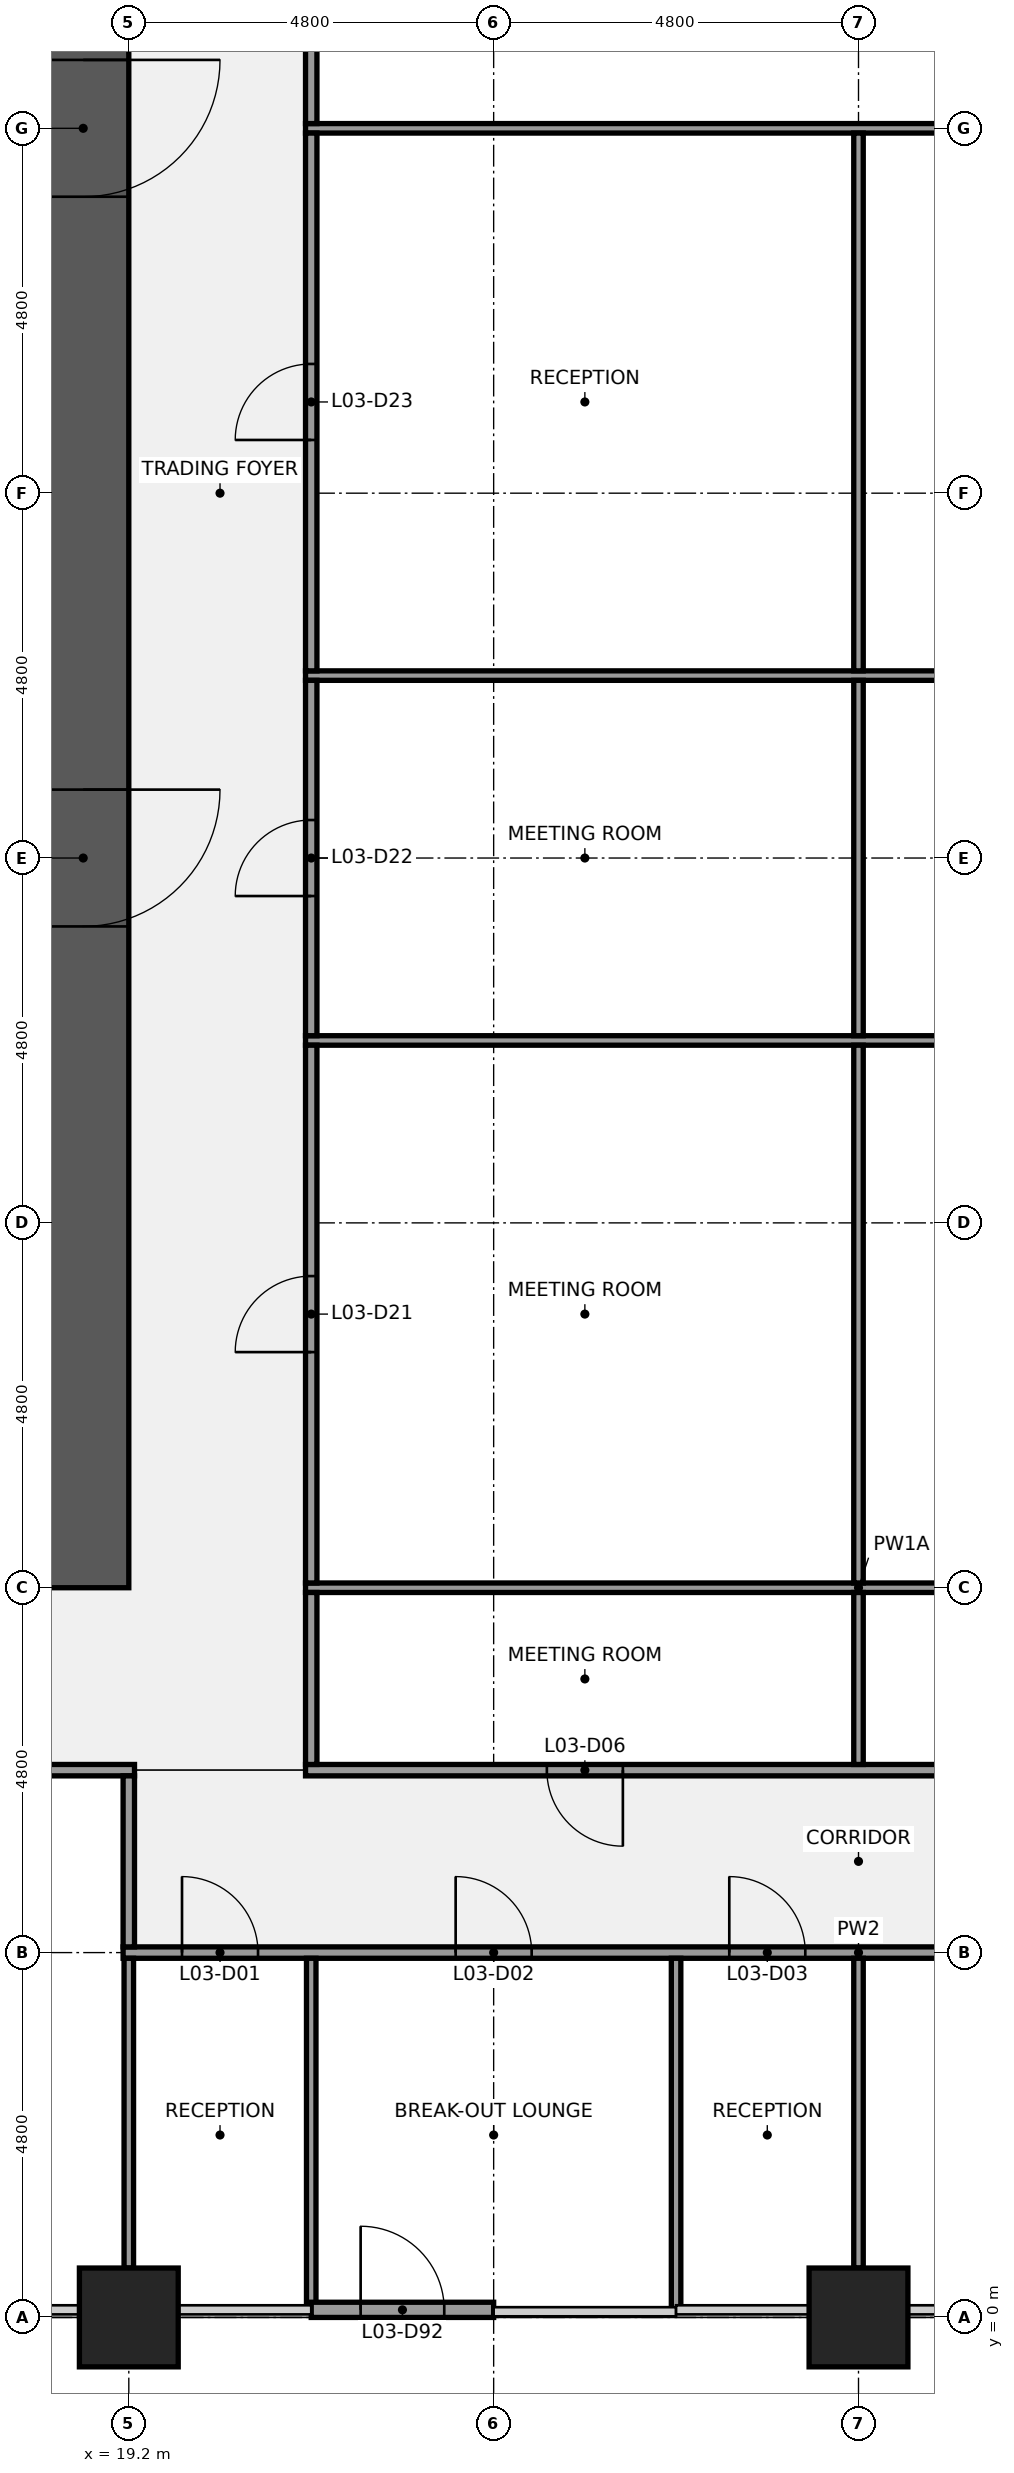
"""IFC4 building model, lengths in metres.
Left out: names, types, materials, properties, quantities, classifications, styles, units other than length and angle.
Written with IfcOpenShell. Run it as: python <this file> out.ifc"""

import sys

from ifc_helpers import new_model, si_unit, direction, frame, frame_2d, origin, origin_2d, place, context, subcontext, project, spatial, rectangle, extrude, element, fill, save


model = new_model("IFC4")
c1 = context("Model", 3, precision=1e-05, world=origin(), true_north=direction((0.0, 1.0)))
c2 = subcontext(c1, "Body", "Model", "MODEL_VIEW")
j1 = project(units=[si_unit("LENGTHUNIT", "METRE"), si_unit("PLANEANGLEUNIT", "RADIAN")], contexts=[c1])
p1 = place(None, origin())
s1 = spatial("IfcSite", under=j1, at=p1, CompositionType="ELEMENT")
p2 = place(p1, origin())
s2 = spatial("IfcBuilding", under=s1, at=p2, CompositionType="ELEMENT")
p3 = place(p2, frame((0.0, 0.0, 21.4)))
s3 = spatial("IfcBuildingStorey", under=s2, at=p3, CompositionType="ELEMENT", Elevation=21.4)
for number, where, z_axis, x_axis in (
    (1, (19.2, 0.0, 0.0), (0.0, 0.0, 1.0), (1.0, 0.0, 0.0)),
    (2, (28.8, 0.0, 0.0), (0.0, 0.0, 1.0), (1.0, 0.0, 0.0)),
):
    element("IfcColumn", number, at=place(p3, frame(where, z_axis=z_axis, x_axis=x_axis)), inside=s3, PredefinedType="COLUMN", context=c2, shape_type="SweptSolid", body=[
        extrude(rectangle(XDim=1.3, YDim=1.3, at=origin_2d()), origin(), (0.0, 0.0, 1.0), 4.4),
    ])
p4 = place(p3, frame((18.6, 38.4, 0.0), z_axis=(0.0, 0.0, 1.0), x_axis=(0.0, -1.0, 0.0)))
e3 = element("IfcWall", 3, at=p4, inside=s3, PredefinedType="SHEAR", context=c2, shape_type="SweptSolid", body=[
    extrude(rectangle(XDim=28.8, YDim=1.2, at=frame_2d((14.4, 0.0))), origin(), (0.0, 0.0, 1.0), 4.24),
])
p5 = place(p4, frame((18.3, 0.0, 0.0)))
e4 = element("IfcOpeningElement", 4, at=p5, cuts=e3, PredefinedType="OPENING", context=c2, shape_type="SweptSolid", body=[
    extrude(rectangle(XDim=1.8, YDim=2.1, at=frame_2d((0.9, 1.05))), frame((0.0, 0.61, 0.0), z_axis=(0.0, -1.0, 0.0), x_axis=(1.0, 0.0, 0.0)), (0.0, 0.0, 1.0), 1.22),
])
p6 = place(p4, frame((8.7, 0.0, 0.0)))
e5 = element("IfcOpeningElement", 5, at=p6, cuts=e3, PredefinedType="OPENING", context=c2, shape_type="SweptSolid", body=[
    extrude(rectangle(XDim=1.8, YDim=2.1, at=frame_2d((0.9, 1.05))), frame((0.0, 0.61, 0.0), z_axis=(0.0, -1.0, 0.0), x_axis=(1.0, 0.0, 0.0)), (0.0, 0.0, 1.0), 1.22),
])
p7 = place(p3, frame((19.125, 4.8, 0.0), z_axis=(0.0, 0.0, 1.0), x_axis=(1.0, 0.0, 0.0)))
e6 = element("IfcWall", 6, at=p7, inside=s3, PredefinedType="PARTITIONING", context=c2, shape_type="SweptSolid", body=[
    extrude(rectangle(XDim=19.35, YDim=0.15, at=frame_2d((9.675, 0.0))), origin(), (0.0, 0.0, 1.0), 3.27),
])
p8 = place(p7, frame((0.775, 0.0, 0.0)))
e7 = element("IfcOpeningElement", 7, at=p8, cuts=e6, PredefinedType="OPENING", context=c2, shape_type="SweptSolid", body=[
    extrude(rectangle(XDim=1.0, YDim=2.1, at=frame_2d((0.5, 1.05))), frame((0.0, 0.085, 0.0), z_axis=(0.0, -1.0, 0.0), x_axis=(1.0, 0.0, 0.0)), (0.0, 0.0, 1.0), 0.17),
])
p9 = place(p7, frame((4.375, 0.0, 0.0)))
e8 = element("IfcOpeningElement", 8, at=p9, cuts=e6, PredefinedType="OPENING", context=c2, shape_type="SweptSolid", body=[
    extrude(rectangle(XDim=1.0, YDim=2.1, at=frame_2d((0.5, 1.05))), frame((0.0, 0.085, 0.0), z_axis=(0.0, -1.0, 0.0), x_axis=(1.0, 0.0, 0.0)), (0.0, 0.0, 1.0), 0.17),
])
p10 = place(p7, frame((7.975, 0.0, 0.0)))
e9 = element("IfcOpeningElement", 9, at=p10, cuts=e6, PredefinedType="OPENING", context=c2, shape_type="SweptSolid", body=[
    extrude(rectangle(XDim=1.0, YDim=2.1, at=frame_2d((0.5, 1.05))), frame((0.0, 0.085, 0.0), z_axis=(0.0, -1.0, 0.0), x_axis=(1.0, 0.0, 0.0)), (0.0, 0.0, 1.0), 0.17),
])
p11 = place(p7, frame((13.975, 0.0, 0.0)))
e10 = element("IfcOpeningElement", 10, at=p11, cuts=e6, PredefinedType="OPENING", context=c2, shape_type="SweptSolid", body=[
    extrude(rectangle(XDim=1.0, YDim=2.1, at=frame_2d((0.5, 1.05))), frame((0.0, 0.085, 0.0), z_axis=(0.0, -1.0, 0.0), x_axis=(1.0, 0.0, 0.0)), (0.0, 0.0, 1.0), 0.17),
])
p12 = place(p3, frame((14.325, 7.2, 0.0), z_axis=(0.0, 0.0, 1.0), x_axis=(1.0, 0.0, 0.0)))
e11 = element("IfcWall", 11, at=p12, inside=s3, PredefinedType="PARTITIONING", context=c2, shape_type="SweptSolid", body=[
    extrude(rectangle(XDim=4.95, YDim=0.15, at=frame_2d((2.475, 0.0))), origin(), (0.0, 0.0, 1.0), 3.27),
])
p13 = place(p12, frame((1.975, 0.0, 0.0)))
e12 = element("IfcOpeningElement", 12, at=p13, cuts=e11, PredefinedType="OPENING", context=c2, shape_type="SweptSolid", body=[
    extrude(rectangle(XDim=1.0, YDim=2.1, at=frame_2d((0.5, 1.05))), frame((0.0, 0.085, 0.0), z_axis=(0.0, -1.0, 0.0), x_axis=(1.0, 0.0, 0.0)), (0.0, 0.0, 1.0), 0.17),
])
p14 = place(p3, frame((21.525, 7.2, 0.0), z_axis=(0.0, 0.0, 1.0), x_axis=(1.0, 0.0, 0.0)))
e13 = element("IfcWall", 13, at=p14, inside=s3, PredefinedType="PARTITIONING", context=c2, shape_type="SweptSolid", body=[
    extrude(rectangle(XDim=14.55, YDim=0.15, at=frame_2d((7.275, 0.0))), origin(), (0.0, 0.0, 1.0), 3.27),
])
p15 = place(p14, frame((3.175, 0.0, 0.0)))
e14 = element("IfcOpeningElement", 14, at=p15, cuts=e13, PredefinedType="OPENING", context=c2, shape_type="SweptSolid", body=[
    extrude(rectangle(XDim=1.0, YDim=2.1, at=frame_2d((0.5, 1.05))), frame((0.0, 0.085, 0.0), z_axis=(0.0, -1.0, 0.0), x_axis=(1.0, 0.0, 0.0)), (0.0, 0.0, 1.0), 0.17),
])
p16 = place(p14, frame((10.375, 0.0, 0.0)))
e15 = element("IfcOpeningElement", 15, at=p16, cuts=e13, PredefinedType="OPENING", context=c2, shape_type="SweptSolid", body=[
    extrude(rectangle(XDim=1.0, YDim=2.1, at=frame_2d((0.5, 1.05))), frame((0.0, 0.085, 0.0), z_axis=(0.0, -1.0, 0.0), x_axis=(1.0, 0.0, 0.0)), (0.0, 0.0, 1.0), 0.17),
])
for number, where, z_axis, x_axis in (
    (16, (21.525, 9.6, 0.0), (0.0, 0.0, 1.0), (1.0, 0.0, 0.0)),
    (17, (21.525, 16.8, 0.0), (0.0, 0.0, 1.0), (1.0, 0.0, 0.0)),
    (18, (21.525, 21.6, 0.0), (0.0, 0.0, 1.0), (1.0, 0.0, 0.0)),
    (19, (21.525, 28.8, 0.0), (0.0, 0.0, 1.0), (1.0, 0.0, 0.0)),
):
    element("IfcWall", number, at=place(p3, frame(where, z_axis=z_axis, x_axis=x_axis)), inside=s3, PredefinedType="PARTITIONING", context=c2, shape_type="SweptSolid", body=[
        extrude(rectangle(XDim=14.55, YDim=0.125, at=frame_2d((7.275, 0.0))), origin(), (0.0, 0.0, 1.0), 3.27),
    ])
p17 = place(p3, frame((19.2, 0.65, 0.0), z_axis=(0.0, 0.0, 1.0), x_axis=(0.0, 1.0, 0.0)))
e20 = element("IfcWall", 20, at=p17, inside=s3, PredefinedType="PARTITIONING", context=c2, shape_type="SweptSolid", body=[
    extrude(rectangle(XDim=4.075, YDim=0.125, at=frame_2d((2.038, 0.0))), origin(), (0.0, 0.0, 1.0), 3.27),
])
p18 = place(p3, frame((19.2, 4.875, 0.0), z_axis=(0.0, 0.0, 1.0), x_axis=(0.0, 1.0, 0.0)))
e21 = element("IfcWall", 21, at=p18, inside=s3, PredefinedType="PARTITIONING", context=c2, shape_type="SweptSolid", body=[
    extrude(rectangle(XDim=2.25, YDim=0.15, at=frame_2d((1.125, 0.0))), origin(), (0.0, 0.0, 1.0), 3.27),
])
p19 = place(p3, frame((21.6, 0.1, 0.0), z_axis=(0.0, 0.0, 1.0), x_axis=(0.0, 1.0, 0.0)))
e22 = element("IfcWall", 22, at=p19, inside=s3, PredefinedType="PARTITIONING", context=c2, shape_type="SweptSolid", body=[
    extrude(rectangle(XDim=4.625, YDim=0.125, at=frame_2d((2.312, 0.0))), origin(), (0.0, 0.0, 1.0), 3.27),
])
p20 = place(p3, frame((21.6, 7.275, 0.0), z_axis=(0.0, 0.0, 1.0), x_axis=(0.0, 1.0, 0.0)))
e23 = element("IfcWall", 23, at=p20, inside=s3, PredefinedType="PARTITIONING", context=c2, shape_type="SweptSolid", body=[
    extrude(rectangle(XDim=2.263, YDim=0.15, at=frame_2d((1.131, 0.0))), origin(), (0.0, 0.0, 1.0), 3.27),
])
p21 = place(p3, frame((21.6, 9.663, 0.0), z_axis=(0.0, 0.0, 1.0), x_axis=(0.0, 1.0, 0.0)))
e24 = element("IfcWall", 24, at=p21, inside=s3, PredefinedType="PARTITIONING", context=c2, shape_type="SweptSolid", body=[
    extrude(rectangle(XDim=7.075, YDim=0.15, at=frame_2d((3.538, 0.0))), origin(), (0.0, 0.0, 1.0), 3.27),
])
p22 = place(p21, frame((3.038, 0.0, 0.0)))
e25 = element("IfcOpeningElement", 25, at=p22, cuts=e24, PredefinedType="OPENING", context=c2, shape_type="SweptSolid", body=[
    extrude(rectangle(XDim=1.0, YDim=2.1, at=frame_2d((0.5, 1.05))), frame((0.0, 0.085, 0.0), z_axis=(0.0, -1.0, 0.0), x_axis=(1.0, 0.0, 0.0)), (0.0, 0.0, 1.0), 0.17),
])
p23 = place(p3, frame((21.6, 16.863, 0.0), z_axis=(0.0, 0.0, 1.0), x_axis=(0.0, 1.0, 0.0)))
e26 = element("IfcWall", 26, at=p23, inside=s3, PredefinedType="PARTITIONING", context=c2, shape_type="SweptSolid", body=[
    extrude(rectangle(XDim=4.675, YDim=0.15, at=frame_2d((2.337, 0.0))), origin(), (0.0, 0.0, 1.0), 3.27),
])
p24 = place(p23, frame((1.837, 0.0, 0.0)))
e27 = element("IfcOpeningElement", 27, at=p24, cuts=e26, PredefinedType="OPENING", context=c2, shape_type="SweptSolid", body=[
    extrude(rectangle(XDim=1.0, YDim=2.1, at=frame_2d((0.5, 1.05))), frame((0.0, 0.085, 0.0), z_axis=(0.0, -1.0, 0.0), x_axis=(1.0, 0.0, 0.0)), (0.0, 0.0, 1.0), 0.17),
])
p25 = place(p3, frame((21.6, 21.663, 0.0), z_axis=(0.0, 0.0, 1.0), x_axis=(0.0, 1.0, 0.0)))
e28 = element("IfcWall", 28, at=p25, inside=s3, PredefinedType="PARTITIONING", context=c2, shape_type="SweptSolid", body=[
    extrude(rectangle(XDim=7.075, YDim=0.15, at=frame_2d((3.538, 0.0))), origin(), (0.0, 0.0, 1.0), 3.27),
])
p26 = place(p25, frame((3.038, 0.0, 0.0)))
e29 = element("IfcOpeningElement", 29, at=p26, cuts=e28, PredefinedType="OPENING", context=c2, shape_type="SweptSolid", body=[
    extrude(rectangle(XDim=1.0, YDim=2.1, at=frame_2d((0.5, 1.05))), frame((0.0, 0.085, 0.0), z_axis=(0.0, -1.0, 0.0), x_axis=(1.0, 0.0, 0.0)), (0.0, 0.0, 1.0), 0.17),
])
p27 = place(p3, frame((21.6, 28.863, 0.0), z_axis=(0.0, 0.0, 1.0), x_axis=(0.0, 1.0, 0.0)))
e30 = element("IfcWall", 30, at=p27, inside=s3, PredefinedType="PARTITIONING", context=c2, shape_type="SweptSolid", body=[
    extrude(rectangle(XDim=4.675, YDim=0.15, at=frame_2d((2.337, 0.0))), origin(), (0.0, 0.0, 1.0), 3.27),
])
p28 = place(p27, frame((1.837, 0.0, 0.0)))
e31 = element("IfcOpeningElement", 31, at=p28, cuts=e30, PredefinedType="OPENING", context=c2, shape_type="SweptSolid", body=[
    extrude(rectangle(XDim=1.0, YDim=2.1, at=frame_2d((0.5, 1.05))), frame((0.0, 0.085, 0.0), z_axis=(0.0, -1.0, 0.0), x_axis=(1.0, 0.0, 0.0)), (0.0, 0.0, 1.0), 0.17),
])
p29 = place(p3, frame((26.4, 0.1, 0.0), z_axis=(0.0, 0.0, 1.0), x_axis=(0.0, 1.0, 0.0)))
e32 = element("IfcWall", 32, at=p29, inside=s3, PredefinedType="PARTITIONING", context=c2, shape_type="SweptSolid", body=[
    extrude(rectangle(XDim=4.625, YDim=0.125, at=frame_2d((2.312, 0.0))), origin(), (0.0, 0.0, 1.0), 3.27),
])
p30 = place(p3, frame((28.8, 0.65, 0.0), z_axis=(0.0, 0.0, 1.0), x_axis=(0.0, 1.0, 0.0)))
e33 = element("IfcWall", 33, at=p30, inside=s3, PredefinedType="PARTITIONING", context=c2, shape_type="SweptSolid", body=[
    extrude(rectangle(XDim=4.075, YDim=0.125, at=frame_2d((2.038, 0.0))), origin(), (0.0, 0.0, 1.0), 3.27),
])
p31 = place(p3, frame((28.8, 7.275, 0.0), z_axis=(0.0, 0.0, 1.0), x_axis=(0.0, 1.0, 0.0)))
e34 = element("IfcWall", 34, at=p31, inside=s3, PredefinedType="PARTITIONING", context=c2, shape_type="SweptSolid", body=[
    extrude(rectangle(XDim=2.263, YDim=0.125, at=frame_2d((1.131, 0.0))), origin(), (0.0, 0.0, 1.0), 3.27),
])
p32 = place(p3, frame((28.8, 9.663, 0.0), z_axis=(0.0, 0.0, 1.0), x_axis=(0.0, 1.0, 0.0)))
e35 = element("IfcWall", 35, at=p32, inside=s3, PredefinedType="PARTITIONING", context=c2, shape_type="SweptSolid", body=[
    extrude(rectangle(XDim=7.075, YDim=0.125, at=frame_2d((3.538, 0.0))), origin(), (0.0, 0.0, 1.0), 3.27),
])
p33 = place(p3, frame((28.8, 16.863, 0.0), z_axis=(0.0, 0.0, 1.0), x_axis=(0.0, 1.0, 0.0)))
e36 = element("IfcWall", 36, at=p33, inside=s3, PredefinedType="PARTITIONING", context=c2, shape_type="SweptSolid", body=[
    extrude(rectangle(XDim=4.675, YDim=0.125, at=frame_2d((2.337, 0.0))), origin(), (0.0, 0.0, 1.0), 3.27),
])
p34 = place(p3, frame((28.8, 21.663, 0.0), z_axis=(0.0, 0.0, 1.0), x_axis=(0.0, 1.0, 0.0)))
e37 = element("IfcWall", 37, at=p34, inside=s3, PredefinedType="PARTITIONING", context=c2, shape_type="SweptSolid", body=[
    extrude(rectangle(XDim=7.075, YDim=0.125, at=frame_2d((3.538, 0.0))), origin(), (0.0, 0.0, 1.0), 3.27),
])
p35 = place(p3, frame((21.6, 0.1, 0.0), z_axis=(0.0, 0.0, 1.0), x_axis=(1.0, 0.0, 0.0)))
e38 = element("IfcWall", 38, at=p35, inside=s3, PredefinedType="SOLIDWALL", context=c2, shape_type="SweptSolid", body=[
    extrude(rectangle(XDim=2.4, YDim=0.2, at=frame_2d((1.2, 0.0))), origin(), (0.0, 0.0, 1.0), 3.714),
])
p36 = place(p35, frame((0.65, 0.0, 0.0)))
e39 = element("IfcOpeningElement", 39, at=p36, cuts=e38, PredefinedType="OPENING", context=c2, shape_type="SweptSolid", body=[
    extrude(rectangle(XDim=1.1, YDim=2.1, at=frame_2d((0.55, 1.05))), frame((0.0, 0.11, 0.0), z_axis=(0.0, -1.0, 0.0), x_axis=(1.0, 0.0, 0.0)), (0.0, 0.0, 1.0), 0.22),
])
p37 = place(p3, frame((19.2, -1.075, 0.0), z_axis=(0.0, 0.0, 1.0), x_axis=(1.0, 0.0, 0.0)))
e40 = element("IfcColumn", 40, at=p37, inside=s3, PredefinedType="PILASTER", context=c2, shape_type="SweptSolid", body=[
    extrude(rectangle(XDim=4.2, YDim=0.85, at=origin_2d()), origin(), (0.0, 0.0, 1.0), 4.4),
])
p38 = place(p5, origin())
e41 = element("IfcDoor", 41, at=p38, inside=s3, OperationType="DOUBLE_DOOR_SINGLE_SWING", PredefinedType="DOOR", context=c2, shape_type="SweptSolid", body=[
    extrude(rectangle(XDim=1.8, YDim=2.1, at=frame_2d((0.9, 1.05))), frame((0.0, 0.025, 0.0), z_axis=(0.0, -1.0, 0.0), x_axis=(1.0, 0.0, 0.0)), (0.0, 0.0, 1.0), 0.05),
])
fill(e4, e41)
p39 = place(p6, origin())
e42 = element("IfcDoor", 42, at=p39, inside=s3, OperationType="DOUBLE_DOOR_SINGLE_SWING", PredefinedType="DOOR", context=c2, shape_type="SweptSolid", body=[
    extrude(rectangle(XDim=1.8, YDim=2.1, at=frame_2d((0.9, 1.05))), frame((0.0, 0.025, 0.0), z_axis=(0.0, -1.0, 0.0), x_axis=(1.0, 0.0, 0.0)), (0.0, 0.0, 1.0), 0.05),
])
fill(e5, e42)
p40 = place(p8, origin())
e43 = element("IfcDoor", 43, at=p40, inside=s3, OperationType="SINGLE_SWING_LEFT", PredefinedType="DOOR", context=c2, shape_type="SweptSolid", body=[
    extrude(rectangle(XDim=1.0, YDim=2.1, at=frame_2d((0.5, 1.05))), frame((0.0, 0.025, 0.0), z_axis=(0.0, -1.0, 0.0), x_axis=(1.0, 0.0, 0.0)), (0.0, 0.0, 1.0), 0.05),
])
fill(e7, e43)
p41 = place(p9, origin())
e44 = element("IfcDoor", 44, at=p41, inside=s3, OperationType="SINGLE_SWING_LEFT", PredefinedType="DOOR", context=c2, shape_type="SweptSolid", body=[
    extrude(rectangle(XDim=1.0, YDim=2.1, at=frame_2d((0.5, 1.05))), frame((0.0, 0.025, 0.0), z_axis=(0.0, -1.0, 0.0), x_axis=(1.0, 0.0, 0.0)), (0.0, 0.0, 1.0), 0.05),
])
fill(e8, e44)
p42 = place(p10, origin())
e45 = element("IfcDoor", 45, at=p42, inside=s3, OperationType="SINGLE_SWING_LEFT", PredefinedType="DOOR", context=c2, shape_type="SweptSolid", body=[
    extrude(rectangle(XDim=1.0, YDim=2.1, at=frame_2d((0.5, 1.05))), frame((0.0, 0.025, 0.0), z_axis=(0.0, -1.0, 0.0), x_axis=(1.0, 0.0, 0.0)), (0.0, 0.0, 1.0), 0.05),
])
fill(e9, e45)
p43 = place(p15, origin())
e46 = element("IfcDoor", 46, at=p43, inside=s3, OperationType="SINGLE_SWING_RIGHT", PredefinedType="DOOR", context=c2, shape_type="SweptSolid", body=[
    extrude(rectangle(XDim=1.0, YDim=2.1, at=frame_2d((0.5, 1.05))), frame((0.0, 0.025, 0.0), z_axis=(0.0, -1.0, 0.0), x_axis=(1.0, 0.0, 0.0)), (0.0, 0.0, 1.0), 0.05),
])
fill(e14, e46)
p44 = place(p22, origin())
e47 = element("IfcDoor", 47, at=p44, inside=s3, OperationType="SINGLE_SWING_LEFT", PredefinedType="DOOR", context=c2, shape_type="SweptSolid", body=[
    extrude(rectangle(XDim=1.0, YDim=2.1, at=frame_2d((0.5, 1.05))), frame((0.0, 0.025, 0.0), z_axis=(0.0, -1.0, 0.0), x_axis=(1.0, 0.0, 0.0)), (0.0, 0.0, 1.0), 0.05),
])
fill(e25, e47)
p45 = place(p24, origin())
e48 = element("IfcDoor", 48, at=p45, inside=s3, OperationType="SINGLE_SWING_LEFT", PredefinedType="DOOR", context=c2, shape_type="SweptSolid", body=[
    extrude(rectangle(XDim=1.0, YDim=2.1, at=frame_2d((0.5, 1.05))), frame((0.0, 0.025, 0.0), z_axis=(0.0, -1.0, 0.0), x_axis=(1.0, 0.0, 0.0)), (0.0, 0.0, 1.0), 0.05),
])
fill(e27, e48)
p46 = place(p26, origin())
e49 = element("IfcDoor", 49, at=p46, inside=s3, OperationType="SINGLE_SWING_LEFT", PredefinedType="DOOR", context=c2, shape_type="SweptSolid", body=[
    extrude(rectangle(XDim=1.0, YDim=2.1, at=frame_2d((0.5, 1.05))), frame((0.0, 0.025, 0.0), z_axis=(0.0, -1.0, 0.0), x_axis=(1.0, 0.0, 0.0)), (0.0, 0.0, 1.0), 0.05),
])
fill(e29, e49)
p47 = place(p36, origin())
e50 = element("IfcDoor", 50, at=p47, inside=s3, OperationType="SINGLE_SWING_LEFT", PredefinedType="DOOR", context=c2, shape_type="SweptSolid", body=[
    extrude(rectangle(XDim=1.1, YDim=2.1, at=frame_2d((0.55, 1.05))), frame((0.0, 0.025, 0.0), z_axis=(0.0, -1.0, 0.0), x_axis=(1.0, 0.0, 0.0)), (0.0, 0.0, 1.0), 0.05),
])
fill(e39, e50)
save(model, sys.argv[1])
